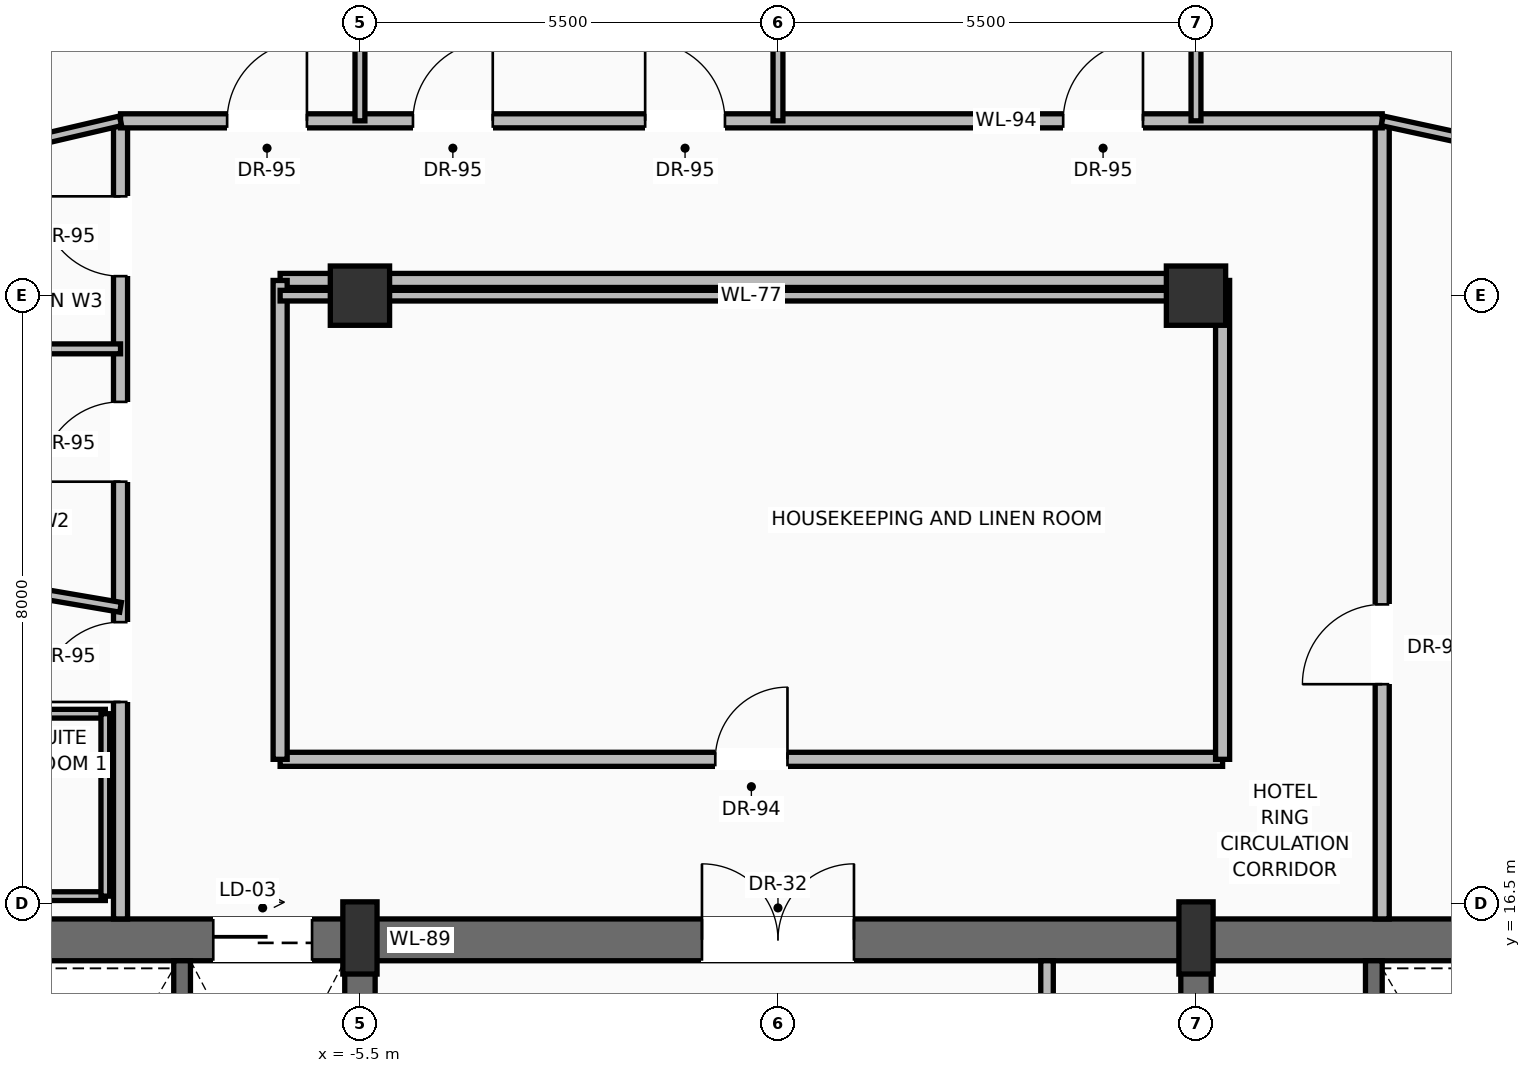
"""IFC4 building model, lengths in metres.
Left out: names, types, materials, properties, quantities, classifications, styles, units other than length and angle.
Written with IfcOpenShell. Run it as: python <this file> out.ifc"""

import sys

from ifc_helpers import new_model, si_unit, direction, frame, frame_2d, origin, origin_2d, place, context, subcontext, project, spatial, rectangle, extrude, source, transform, mapped, element, fill, save


model = new_model("IFC4")
c1 = context("Model", 3, precision=1e-05, world=origin(), true_north=direction((0.0, 1.0)))
c2 = subcontext(c1, "Body", "Model", "MODEL_VIEW")
j1 = project(units=[si_unit("LENGTHUNIT", "METRE"), si_unit("PLANEANGLEUNIT", "RADIAN")], contexts=[c1])
p1 = place(None, origin())
s1 = spatial("IfcSite", under=j1, at=p1, CompositionType="ELEMENT")
p2 = place(p1, origin())
s2 = spatial("IfcBuilding", under=s1, at=p2, CompositionType="ELEMENT")
p3 = place(p2, frame((0.0, 0.0, 237.25)))
s3 = spatial("IfcBuildingStorey", under=s2, at=p3, CompositionType="ELEMENT", Elevation=237.25)
p4 = place(p3, frame((-10.7, 16.025, 0.0), z_axis=(0.0, 0.0, 1.0), x_axis=(1.0, 0.0, 0.0)))
e1 = element("IfcWall", 1, at=p4, inside=s3, PredefinedType="SHEAR", context=c2, shape_type="SweptSolid", body=[
    extrude(rectangle(XDim=21.4, YDim=0.55, at=frame_2d((10.7, 0.0))), origin(), (0.0, 0.0, 1.0), 3.24),
])
p5 = place(p4, frame((3.27, 0.0, 0.0)))
e2 = element("IfcOpeningElement", 2, at=p5, cuts=e1, PredefinedType="OPENING", context=c2, shape_type="SweptSolid", body=[
    extrude(rectangle(XDim=1.3, YDim=2.3, at=frame_2d((0.65, 1.15))), frame((0.0, 0.285, 0.0), z_axis=(0.0, -1.0, 0.0), x_axis=(1.0, 0.0, 0.0)), (0.0, 0.0, 1.0), 0.57),
])
p6 = place(p4, frame((9.7, 0.0, 0.0)))
e3 = element("IfcOpeningElement", 3, at=p6, cuts=e1, PredefinedType="OPENING", context=c2, shape_type="SweptSolid", body=[
    extrude(rectangle(XDim=2.0, YDim=2.4, at=frame_2d((1.0, 1.2))), frame((0.0, 0.285, 0.0), z_axis=(0.0, -1.0, 0.0), x_axis=(1.0, 0.0, 0.0)), (0.0, 0.0, 1.0), 0.57),
])
p7 = place(p3, frame((-5.5, 0.575, 0.0), z_axis=(0.0, 0.0, 1.0), x_axis=(0.0, 1.0, 0.0)))
e4 = element("IfcWall", 4, at=p7, inside=s3, PredefinedType="SHEAR", context=c2, shape_type="SweptSolid", body=[
    extrude(rectangle(XDim=15.45, YDim=0.4, at=frame_2d((7.725, 0.0))), origin(), (0.0, 0.0, 1.0), 3.24),
])
p8 = place(p7, frame((8.925, 0.0, 0.0)))
e5 = element("IfcOpeningElement", 5, at=p8, cuts=e4, PredefinedType="OPENING", context=c2, shape_type="SweptSolid", body=[
    extrude(rectangle(XDim=1.1, YDim=2.2, at=frame_2d((0.55, 1.1))), frame((0.0, 0.21, 0.0), z_axis=(0.0, -1.0, 0.0), x_axis=(1.0, 0.0, 0.0)), (0.0, 0.0, 1.0), 0.42),
])
p9 = place(p3, frame((5.5, 0.575, 0.0), z_axis=(0.0, 0.0, 1.0), x_axis=(0.0, 1.0, 0.0)))
e6 = element("IfcWall", 6, at=p9, inside=s3, PredefinedType="SHEAR", context=c2, shape_type="SweptSolid", body=[
    extrude(rectangle(XDim=15.45, YDim=0.4, at=frame_2d((7.725, 0.0))), origin(), (0.0, 0.0, 1.0), 3.24),
])
p10 = place(p9, frame((8.925, 0.0, 0.0)))
e7 = element("IfcOpeningElement", 7, at=p10, cuts=e6, PredefinedType="OPENING", context=c2, shape_type="SweptSolid", body=[
    extrude(rectangle(XDim=1.1, YDim=2.2, at=frame_2d((0.55, 1.1))), frame((0.0, 0.21, 0.0), z_axis=(0.0, -1.0, 0.0), x_axis=(1.0, 0.0, 0.0)), (0.0, 0.0, 1.0), 0.42),
])
m1 = source(origin(), c2, "Body", "SweptSolid", [
    extrude(rectangle(XDim=0.45, YDim=0.95, at=origin_2d()), origin(), (0.0, 0.0, 1.0), 3.45),
])
for number, where, z_axis, x_axis in (
    (8, (-5.5, 16.05, 0.0), (0.0, 0.0, 1.0), (1.0, 0.0, 0.0)),
    (9, (5.5, 16.05, 0.0), (0.0, 0.0, 1.0), (1.0, 0.0, 0.0)),
):
    element("IfcColumn", number, at=place(p3, frame(where, z_axis=z_axis, x_axis=x_axis)), inside=s3, PredefinedType="PILASTER", context=c2, shape_type="MappedRepresentation", body=[
        mapped(m1, transform((0.0, 0.0, 0.0), scale=1.0)),
    ])
m2 = source(origin(), c2, "Body", "SweptSolid", [
    extrude(rectangle(XDim=0.78, YDim=0.78, at=origin_2d()), origin(), (0.0, 0.0, 1.0), 3.45),
])
for number, where, z_axis, x_axis in (
    (10, (-5.5, 24.5, 0.0), (0.0, 0.0, 1.0), (1.0, 0.0, 0.0)),
    (11, (5.5, 24.5, 0.0), (0.0, 0.0, 1.0), (1.0, 0.0, 0.0)),
):
    element("IfcColumn", number, at=place(p3, frame(where, z_axis=z_axis, x_axis=x_axis)), inside=s3, PredefinedType="COLUMN", context=c2, shape_type="MappedRepresentation", body=[
        mapped(m2, transform((0.0, 0.0, 0.0), scale=1.0)),
    ])
p11 = place(p3, frame((-19.43, 15.137, 0.0), z_axis=(0.0, 0.0, 1.0), x_axis=(0.508699873742, 0.860943922944, 0.0)))
e12 = element("IfcWall", 12, at=p11, inside=s3, PredefinedType="SOLIDWALL", context=c2, shape_type="SweptSolid", body=[
    extrude(rectangle(XDim=19.559, YDim=0.28, at=frame_2d((9.779, 0.0))), origin(), (0.0, 0.0, 1.0), 2.82),
])
p12 = place(p11, frame((4.694, 0.0, 0.0)))
e13 = element("IfcOpeningElement", 13, at=p12, cuts=e12, PredefinedType="OPENING", context=c2, shape_type="SweptSolid", body=[
    extrude(rectangle(XDim=1.6, YDim=2.35, at=frame_2d((0.8, 1.175))), frame((0.0, 0.15, 0.0), z_axis=(0.0, -1.0, 0.0), x_axis=(1.0, 0.0, 0.0)), (0.0, 0.0, 1.0), 0.3),
])
p13 = place(p11, frame((13.3, 0.0, 0.9)))
e14 = element("IfcOpeningElement", 14, at=p13, cuts=e12, PredefinedType="OPENING", context=c2, shape_type="SweptSolid", body=[
    extrude(rectangle(XDim=1.55, YDim=1.75, at=frame_2d((0.775, 0.875))), frame((0.0, 0.15, 0.0), z_axis=(0.0, -1.0, 0.0), x_axis=(1.0, 0.0, 0.0)), (0.0, 0.0, 1.0), 0.3),
])
p14 = place(p3, frame((8.545, 32.072, 0.0), z_axis=(0.0, 0.0, 1.0), x_axis=(0.52585107611, -0.850576654837, 0.0)))
e15 = element("IfcWall", 15, at=p14, inside=s3, PredefinedType="SOLIDWALL", context=c2, shape_type="SweptSolid", body=[
    extrude(rectangle(XDim=19.616, YDim=0.28, at=frame_2d((9.808, 0.0))), origin(), (0.0, 0.0, 1.0), 2.82),
])
p15 = place(p14, frame((4.708, 0.0, 0.0)))
e16 = element("IfcOpeningElement", 16, at=p15, cuts=e15, PredefinedType="OPENING", context=c2, shape_type="SweptSolid", body=[
    extrude(rectangle(XDim=1.6, YDim=2.35, at=frame_2d((0.8, 1.175))), frame((0.0, 0.15, 0.0), z_axis=(0.0, -1.0, 0.0), x_axis=(1.0, 0.0, 0.0)), (0.0, 0.0, 1.0), 0.3),
])
p16 = place(p14, frame((13.339, 0.0, 0.9)))
e17 = element("IfcOpeningElement", 17, at=p16, cuts=e15, PredefinedType="OPENING", context=c2, shape_type="SweptSolid", body=[
    extrude(rectangle(XDim=1.55, YDim=1.75, at=frame_2d((0.775, 0.875))), frame((0.0, 0.15, 0.0), z_axis=(0.0, -1.0, 0.0), x_axis=(1.0, 0.0, 0.0)), (0.0, 0.0, 1.0), 0.3),
])
for number, where, z_axis, x_axis in (
    (18, (-7.84, 11.87, 0.0), (0.0, 0.0, 1.0), (0.0, 1.0, 0.0)),
    (19, (7.84, 11.87, 0.0), (0.0, 0.0, 1.0), (0.0, 1.0, 0.0)),
):
    element("IfcWall", number, at=place(p3, frame(where, z_axis=z_axis, x_axis=x_axis)), inside=s3, PredefinedType="SOLIDWALL", context=c2, shape_type="SweptSolid", body=[
        extrude(rectangle(XDim=3.88, YDim=0.22, at=frame_2d((1.94, 0.0))), origin(), (0.0, 0.0, 1.0), 3.24),
    ])
p17 = place(p3, frame((3.54, 11.22, 0.0), z_axis=(0.0, 0.0, 1.0), x_axis=(0.0, 1.0, 0.0)))
e20 = element("IfcWall", 20, at=p17, inside=s3, PredefinedType="PARTITIONING", context=c2, shape_type="SweptSolid", body=[
    extrude(rectangle(XDim=4.53, YDim=0.165, at=frame_2d((2.265, 0.0))), origin(), (0.0, 0.0, 1.0), 3.232),
])
p18 = place(p17, frame((1.25, 0.0, 0.0)))
e21 = element("IfcOpeningElement", 21, at=p18, cuts=e20, PredefinedType="OPENING", context=c2, shape_type="SweptSolid", body=[
    extrude(rectangle(XDim=0.9, YDim=2.1, at=frame_2d((0.45, 1.05))), frame((0.0, 0.093, 0.0), z_axis=(0.0, -1.0, 0.0), x_axis=(1.0, 0.0, 0.0)), (0.0, 0.0, 1.0), 0.185),
])
p19 = place(p3, frame((-6.55, 18.4, 0.0), z_axis=(0.0, 0.0, 1.0), x_axis=(1.0, 0.0, 0.0)))
e22 = element("IfcWall", 22, at=p19, inside=s3, PredefinedType="PARTITIONING", context=c2, shape_type="SweptSolid", body=[
    extrude(rectangle(XDim=12.4, YDim=0.185, at=frame_2d((6.2, 0.0))), origin(), (0.0, 0.0, 1.0), 3.232),
])
p20 = place(p19, frame((5.725, 0.0, 0.0)))
e23 = element("IfcOpeningElement", 23, at=p20, cuts=e22, PredefinedType="OPENING", context=c2, shape_type="SweptSolid", body=[
    extrude(rectangle(XDim=0.95, YDim=2.2, at=frame_2d((0.475, 1.1))), frame((0.0, 0.103, 0.0), z_axis=(0.0, -1.0, 0.0), x_axis=(1.0, 0.0, 0.0)), (0.0, 0.0, 1.0), 0.205),
])
p21 = place(p3, frame((-6.55, 24.7, 0.0), z_axis=(0.0, 0.0, 1.0), x_axis=(1.0, 0.0, 0.0)))
e24 = element("IfcWall", 24, at=p21, inside=s3, PredefinedType="PARTITIONING", context=c2, shape_type="SweptSolid", body=[
    extrude(rectangle(XDim=12.4, YDim=0.185, at=frame_2d((6.2, 0.0))), origin(), (0.0, 0.0, 1.0), 2.683),
])
for number, where, z_axis, x_axis in (
    (25, (-6.55, 18.4, 0.0), (0.0, 0.0, 1.0), (0.0, 1.0, 0.0)),
    (26, (5.85, 18.4, 0.0), (0.0, 0.0, 1.0), (0.0, 1.0, 0.0)),
):
    element("IfcWall", number, at=place(p3, frame(where, z_axis=z_axis, x_axis=x_axis)), inside=s3, PredefinedType="PARTITIONING", context=c2, shape_type="SweptSolid", body=[
        extrude(rectangle(XDim=6.3, YDim=0.185, at=frame_2d((3.15, 0.0))), origin(), (0.0, 0.0, 1.0), 3.232),
    ])
p22 = place(p3, frame((-8.65, 16.3, 0.0), z_axis=(0.0, 0.0, 1.0), x_axis=(0.0, 1.0, 0.0)))
e27 = element("IfcWall", 27, at=p22, inside=s3, PredefinedType="PARTITIONING", context=c2, shape_type="SweptSolid", body=[
    extrude(rectangle(XDim=10.5, YDim=0.185, at=frame_2d((5.25, 0.0))), origin(), (0.0, 0.0, 1.0), 3.232),
])
p23 = place(p22, frame((2.854, 0.0, 0.0)))
e28 = element("IfcOpeningElement", 28, at=p23, cuts=e27, PredefinedType="OPENING", context=c2, shape_type="SweptSolid", body=[
    extrude(rectangle(XDim=1.05, YDim=2.25, at=frame_2d((0.525, 1.125))), frame((0.0, 0.103, 0.0), z_axis=(0.0, -1.0, 0.0), x_axis=(1.0, 0.0, 0.0)), (0.0, 0.0, 1.0), 0.205),
])
p24 = place(p22, frame((5.752, 0.0, 0.0)))
e29 = element("IfcOpeningElement", 29, at=p24, cuts=e27, PredefinedType="OPENING", context=c2, shape_type="SweptSolid", body=[
    extrude(rectangle(XDim=1.05, YDim=2.25, at=frame_2d((0.525, 1.125))), frame((0.0, 0.103, 0.0), z_axis=(0.0, -1.0, 0.0), x_axis=(1.0, 0.0, 0.0)), (0.0, 0.0, 1.0), 0.205),
])
p25 = place(p22, frame((8.457, 0.0, 0.0)))
e30 = element("IfcOpeningElement", 30, at=p25, cuts=e27, PredefinedType="OPENING", context=c2, shape_type="SweptSolid", body=[
    extrude(rectangle(XDim=1.05, YDim=2.25, at=frame_2d((0.525, 1.125))), frame((0.0, 0.103, 0.0), z_axis=(0.0, -1.0, 0.0), x_axis=(1.0, 0.0, 0.0)), (0.0, 0.0, 1.0), 0.205),
])
p26 = place(p3, frame((7.95, 16.3, 0.0), z_axis=(0.0, 0.0, 1.0), x_axis=(0.0, 1.0, 0.0)))
e31 = element("IfcWall", 31, at=p26, inside=s3, PredefinedType="PARTITIONING", context=c2, shape_type="SweptSolid", body=[
    extrude(rectangle(XDim=10.5, YDim=0.185, at=frame_2d((5.25, 0.0))), origin(), (0.0, 0.0, 1.0), 3.232),
])
p27 = place(p26, frame((3.088, 0.0, 0.0)))
e32 = element("IfcOpeningElement", 32, at=p27, cuts=e31, PredefinedType="OPENING", context=c2, shape_type="SweptSolid", body=[
    extrude(rectangle(XDim=1.05, YDim=2.25, at=frame_2d((0.525, 1.125))), frame((0.0, 0.103, 0.0), z_axis=(0.0, -1.0, 0.0), x_axis=(1.0, 0.0, 0.0)), (0.0, 0.0, 1.0), 0.205),
])
p28 = place(p3, frame((-8.65, 26.8, 0.0), z_axis=(0.0, 0.0, 1.0), x_axis=(1.0, 0.0, 0.0)))
e33 = element("IfcWall", 33, at=p28, inside=s3, PredefinedType="PARTITIONING", context=c2, shape_type="SweptSolid", body=[
    extrude(rectangle(XDim=16.6, YDim=0.185, at=frame_2d((8.3, 0.0))), origin(), (0.0, 0.0, 1.0), 3.232),
])
p29 = place(p28, frame((3.847, 0.0, 0.0)))
e34 = element("IfcOpeningElement", 34, at=p29, cuts=e33, PredefinedType="OPENING", context=c2, shape_type="SweptSolid", body=[
    extrude(rectangle(XDim=1.05, YDim=2.25, at=frame_2d((0.525, 1.125))), frame((0.0, 0.103, 0.0), z_axis=(0.0, -1.0, 0.0), x_axis=(1.0, 0.0, 0.0)), (0.0, 0.0, 1.0), 0.205),
])
p30 = place(p28, frame((6.903, 0.0, 0.0)))
e35 = element("IfcOpeningElement", 35, at=p30, cuts=e33, PredefinedType="OPENING", context=c2, shape_type="SweptSolid", body=[
    extrude(rectangle(XDim=1.05, YDim=2.25, at=frame_2d((0.525, 1.125))), frame((0.0, 0.103, 0.0), z_axis=(0.0, -1.0, 0.0), x_axis=(1.0, 0.0, 0.0)), (0.0, 0.0, 1.0), 0.205),
])
p31 = place(p28, frame((12.403, 0.0, 0.0)))
e36 = element("IfcOpeningElement", 36, at=p31, cuts=e33, PredefinedType="OPENING", context=c2, shape_type="SweptSolid", body=[
    extrude(rectangle(XDim=1.05, YDim=2.25, at=frame_2d((0.525, 1.125))), frame((0.0, 0.103, 0.0), z_axis=(0.0, -1.0, 0.0), x_axis=(1.0, 0.0, 0.0)), (0.0, 0.0, 1.0), 0.205),
])
p32 = place(p28, frame((1.403, 0.0, 0.0)))
e37 = element("IfcOpeningElement", 37, at=p32, cuts=e33, PredefinedType="OPENING", context=c2, shape_type="SweptSolid", body=[
    extrude(rectangle(XDim=1.05, YDim=2.25, at=frame_2d((0.525, 1.125))), frame((0.0, 0.103, 0.0), z_axis=(0.0, -1.0, 0.0), x_axis=(1.0, 0.0, 0.0)), (0.0, 0.0, 1.0), 0.205),
])
p33 = place(p3, frame((-6.55, 24.5, 0.0), z_axis=(0.0, 0.0, 1.0), x_axis=(1.0, 0.0, 0.0)))
e38 = element("IfcWall", 38, at=p33, inside=s3, PredefinedType="PARTITIONING", context=c2, shape_type="SweptSolid", body=[
    extrude(rectangle(XDim=12.4, YDim=0.14, at=frame_2d((6.2, 0.0))), origin(), (0.0, 0.0, 1.0), 2.683),
])
p34 = place(p3, frame((-13.336, 25.707, 0.0), z_axis=(0.0, 0.0, 1.0), x_axis=(0.973859170727, 0.227152626203, 0.0)))
e39 = element("IfcWall", 39, at=p34, inside=s3, PredefinedType="PARTITIONING", context=c2, shape_type="SweptSolid", body=[
    extrude(rectangle(XDim=4.812, YDim=0.13, at=frame_2d((2.406, 0.0))), origin(), (0.0, 0.0, 1.0), 3.232),
])
p35 = place(p3, frame((7.95, 26.8, 0.0), z_axis=(0.0, 0.0, 1.0), x_axis=(0.977283281689, -0.211937224976, 0.0)))
e40 = element("IfcWall", 40, at=p35, inside=s3, PredefinedType="PARTITIONING", context=c2, shape_type="SweptSolid", body=[
    extrude(rectangle(XDim=4.735, YDim=0.13, at=frame_2d((2.367, 0.0))), origin(), (0.0, 0.0, 1.0), 3.232),
])
p36 = place(p35, frame((1.849, 0.0, 0.0)))
e41 = element("IfcOpeningElement", 41, at=p36, cuts=e40, PredefinedType="OPENING", context=c2, shape_type="SweptSolid", body=[
    extrude(rectangle(XDim=0.95, YDim=2.2, at=frame_2d((0.475, 1.1))), frame((0.0, 0.075, 0.0), z_axis=(0.0, -1.0, 0.0), x_axis=(1.0, 0.0, 0.0)), (0.0, 0.0, 1.0), 0.15),
])
p37 = place(p3, frame((-5.5, 26.8, 0.0), z_axis=(0.0, 0.0, 1.0), x_axis=(0.0, 1.0, 0.0)))
e42 = element("IfcWall", 42, at=p37, inside=s3, PredefinedType="PARTITIONING", context=c2, shape_type="SweptSolid", body=[
    extrude(rectangle(XDim=12.169, YDim=0.13, at=frame_2d((6.084, 0.0))), origin(), (0.0, 0.0, 1.0), 2.683),
])
p38 = place(p3, frame((5.5, 26.8, 0.0), z_axis=(0.0, 0.0, 1.0), x_axis=(0.0, 1.0, 0.0)))
e43 = element("IfcWall", 43, at=p38, inside=s3, PredefinedType="PARTITIONING", context=c2, shape_type="SweptSolid", body=[
    extrude(rectangle(XDim=10.444, YDim=0.13, at=frame_2d((5.222, 0.0))), origin(), (0.0, 0.0, 1.0), 2.683),
])
p39 = place(p3, frame((0.0, 26.8, 0.0), z_axis=(0.0, 0.0, 1.0), x_axis=(0.0, 1.0, 0.0)))
e44 = element("IfcWall", 44, at=p39, inside=s3, PredefinedType="PARTITIONING", context=c2, shape_type="SweptSolid", body=[
    extrude(rectangle(XDim=15.953, YDim=0.13, at=frame_2d((7.977, 0.0))), origin(), (0.0, 0.0, 1.0), 3.232),
])
for number, where, z_axis, x_axis in (
    (45, (-11.5, 16.6, 0.0), (0.0, 0.0, 1.0), (1.0, 0.0, 0.0)),
    (46, (-11.5, 19.0, 0.0), (0.0, 0.0, 1.0), (1.0, 0.0, 0.0)),
):
    element("IfcWall", number, at=place(p3, frame(where, z_axis=z_axis, x_axis=x_axis)), inside=s3, PredefinedType="PARTITIONING", context=c2, shape_type="SweptSolid", body=[
        extrude(rectangle(XDim=2.65, YDim=0.115, at=frame_2d((1.325, 0.0))), origin(), (0.0, 0.0, 1.0), 3.232),
    ])
p40 = place(p3, frame((-8.85, 16.6, 0.0), z_axis=(0.0, 0.0, 1.0), x_axis=(0.0, 1.0, 0.0)))
e47 = element("IfcWall", 47, at=p40, inside=s3, PredefinedType="PARTITIONING", context=c2, shape_type="SweptSolid", body=[
    extrude(rectangle(XDim=2.4, YDim=0.115, at=frame_2d((1.2, 0.0))), origin(), (0.0, 0.0, 1.0), 3.232),
])
p41 = place(p3, frame((-15.755, 21.613, 0.0), z_axis=(0.0, 0.0, 1.0), x_axis=(0.985747524056, -0.1682314442, 0.0)))
e48 = element("IfcWall", 48, at=p41, inside=s3, PredefinedType="PARTITIONING", context=c2, shape_type="SweptSolid", body=[
    extrude(rectangle(XDim=7.208, YDim=0.13, at=frame_2d((3.604, 0.0))), origin(), (0.0, 0.0, 1.0), 3.232),
])
p42 = place(p3, frame((-14.463, 23.8, 0.0), z_axis=(0.0, 0.0, 1.0), x_axis=(1.0, 0.0, 0.0)))
e49 = element("IfcWall", 49, at=p42, inside=s3, PredefinedType="PARTITIONING", context=c2, shape_type="SweptSolid", body=[
    extrude(rectangle(XDim=5.813, YDim=0.13, at=frame_2d((2.906, 0.0))), origin(), (0.0, 0.0, 1.0), 3.232),
])
m3 = source(origin(), c2, "Body", "SweptSolid", [
    extrude(rectangle(XDim=1.3, YDim=2.3, at=frame_2d((0.65, 1.15))), frame((0.0, 0.025, 0.0), z_axis=(0.0, -1.0, 0.0), x_axis=(1.0, 0.0, 0.0)), (0.0, 0.0, 1.0), 0.05),
])
p43 = place(p5, origin())
e50 = element("IfcDoor", 50, at=p43, inside=s3, OperationType="SLIDING_TO_RIGHT", PredefinedType="DOOR", context=c2, shape_type="MappedRepresentation", body=[
    mapped(m3, transform((0.0, 0.0, 0.0), scale=1.0)),
])
fill(e2, e50)
m4 = source(origin(), c2, "Body", "SweptSolid", [
    extrude(rectangle(XDim=2.0, YDim=2.4, at=frame_2d((1.0, 1.2))), frame((0.0, 0.025, 0.0), z_axis=(0.0, -1.0, 0.0), x_axis=(1.0, 0.0, 0.0)), (0.0, 0.0, 1.0), 0.05),
])
p44 = place(p6, origin())
e51 = element("IfcDoor", 51, at=p44, inside=s3, OperationType="DOUBLE_DOOR_SINGLE_SWING", PredefinedType="DOOR", context=c2, shape_type="MappedRepresentation", body=[
    mapped(m4, transform((0.0, 0.0, 0.0), scale=1.0)),
])
fill(e3, e51)
m5 = source(origin(), c2, "Body", "SweptSolid", [
    extrude(rectangle(XDim=0.95, YDim=2.2, at=frame_2d((0.475, 1.1))), frame((0.0, 0.025, 0.0), z_axis=(0.0, -1.0, 0.0), x_axis=(1.0, 0.0, 0.0)), (0.0, 0.0, 1.0), 0.05),
])
p45 = place(p20, origin())
e52 = element("IfcDoor", 52, at=p45, inside=s3, OperationType="SINGLE_SWING_RIGHT", PredefinedType="DOOR", context=c2, shape_type="MappedRepresentation", body=[
    mapped(m5, transform((0.0, 0.0, 0.0), scale=1.0)),
])
fill(e23, e52)
m6 = source(origin(), c2, "Body", "SweptSolid", [
    extrude(rectangle(XDim=1.05, YDim=2.25, at=frame_2d((0.525, 1.125))), frame((0.0, 0.025, 0.0), z_axis=(0.0, -1.0, 0.0), x_axis=(1.0, 0.0, 0.0)), (0.0, 0.0, 1.0), 0.05),
])
p46 = place(p23, origin())
e53 = element("IfcDoor", 53, at=p46, inside=s3, OperationType="SINGLE_SWING_LEFT", PredefinedType="DOOR", context=c2, shape_type="MappedRepresentation", body=[
    mapped(m6, transform((0.0, 0.0, 0.0), scale=1.0)),
])
fill(e28, e53)
p47 = place(p24, origin())
e54 = element("IfcDoor", 54, at=p47, inside=s3, OperationType="SINGLE_SWING_LEFT", PredefinedType="DOOR", context=c2, shape_type="MappedRepresentation", body=[
    mapped(m6, transform((0.0, 0.0, 0.0), scale=1.0)),
])
fill(e29, e54)
p48 = place(p25, origin())
e55 = element("IfcDoor", 55, at=p48, inside=s3, OperationType="SINGLE_SWING_RIGHT", PredefinedType="DOOR", context=c2, shape_type="MappedRepresentation", body=[
    mapped(m6, transform((0.0, 0.0, 0.0), scale=1.0)),
])
fill(e30, e55)
p49 = place(p27, origin())
e56 = element("IfcDoor", 56, at=p49, inside=s3, OperationType="SINGLE_SWING_LEFT", PredefinedType="DOOR", context=c2, shape_type="MappedRepresentation", body=[
    mapped(m6, transform((0.0, 0.0, 0.0), scale=1.0)),
])
fill(e32, e56)
p50 = place(p29, origin())
e57 = element("IfcDoor", 57, at=p50, inside=s3, OperationType="SINGLE_SWING_RIGHT", PredefinedType="DOOR", context=c2, shape_type="MappedRepresentation", body=[
    mapped(m6, transform((0.0, 0.0, 0.0), scale=1.0)),
])
fill(e34, e57)
p51 = place(p30, origin())
e58 = element("IfcDoor", 58, at=p51, inside=s3, OperationType="SINGLE_SWING_LEFT", PredefinedType="DOOR", context=c2, shape_type="MappedRepresentation", body=[
    mapped(m6, transform((0.0, 0.0, 0.0), scale=1.0)),
])
fill(e35, e58)
p52 = place(p31, origin())
e59 = element("IfcDoor", 59, at=p52, inside=s3, OperationType="SINGLE_SWING_RIGHT", PredefinedType="DOOR", context=c2, shape_type="MappedRepresentation", body=[
    mapped(m6, transform((0.0, 0.0, 0.0), scale=1.0)),
])
fill(e36, e59)
p53 = place(p32, origin())
e60 = element("IfcDoor", 60, at=p53, inside=s3, OperationType="SINGLE_SWING_RIGHT", PredefinedType="DOOR", context=c2, shape_type="MappedRepresentation", body=[
    mapped(m6, transform((0.0, 0.0, 0.0), scale=1.0)),
])
fill(e37, e60)
save(model, sys.argv[1])
